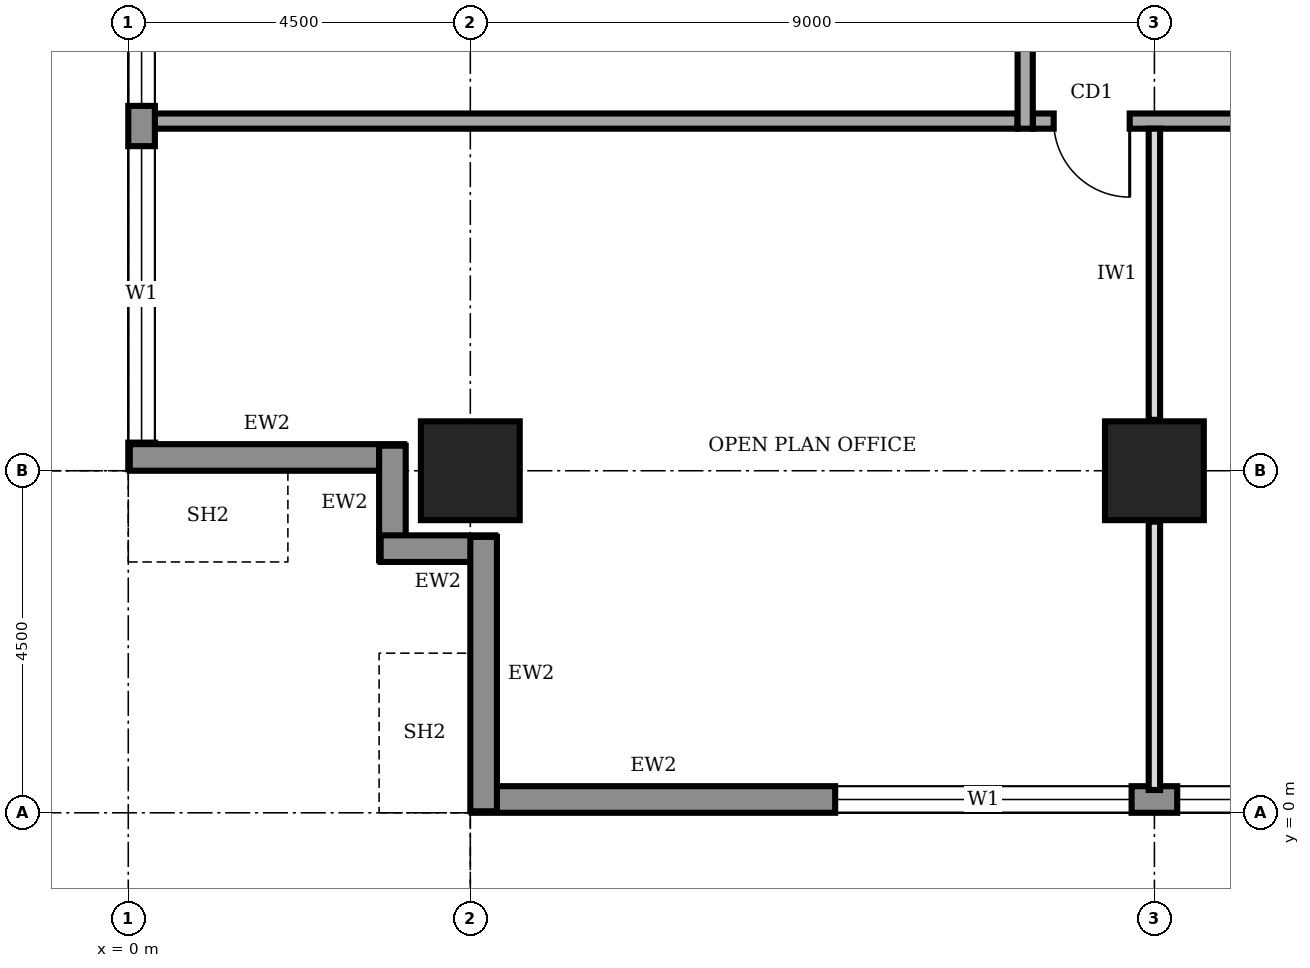
"""IFC4 building model, lengths in metres.
Left out: names, types, materials, properties, quantities, classifications, styles, units other than length and angle.
Written with IfcOpenShell. Run it as: python <this file> out.ifc"""

import sys

from ifc_helpers import new_model, si_unit, direction, frame, frame_2d, origin, origin_2d, place, context, subcontext, project, spatial, rectangle, extrude, element, fill, save


model = new_model("IFC4")
c1 = context("Model", 3, precision=1e-05, world=origin(), true_north=direction((0.0, 1.0)))
c2 = subcontext(c1, "Body", "Model", "MODEL_VIEW")
j1 = project(units=[si_unit("LENGTHUNIT", "METRE"), si_unit("PLANEANGLEUNIT", "RADIAN")], contexts=[c1])
p1 = place(None, origin())
s1 = spatial("IfcSite", under=j1, at=p1, CompositionType="ELEMENT")
p2 = place(p1, origin())
s2 = spatial("IfcBuilding", under=s1, at=p2, CompositionType="ELEMENT")
p3 = place(p2, frame((0.0, 0.0, 277.0)))
s3 = spatial("IfcBuildingStorey", under=s2, at=p3, CompositionType="ELEMENT", Elevation=277.0)
for number, where, z_axis, x_axis in (
    (1, (4.5, 4.5, 0.0), (0.0, 0.0, 1.0), (1.0, 0.0, 0.0)),
    (2, (13.5, 4.5, 0.0), (0.0, 0.0, 1.0), (1.0, 0.0, 0.0)),
):
    element("IfcColumn", number, at=place(p3, frame(where, z_axis=z_axis, x_axis=x_axis)), inside=s3, PredefinedType="COLUMN", context=c2, shape_type="SweptSolid", body=[
        extrude(rectangle(XDim=1.3, YDim=1.3, at=origin_2d()), origin(), (0.0, 0.0, 1.0), 4.0),
    ])
p4 = place(p3, frame((4.52, 0.175, 0.0), z_axis=(0.0, 0.0, 1.0), x_axis=(1.0, 0.0, 0.0)))
e3 = element("IfcWall", 3, at=p4, inside=s3, PredefinedType="STANDARD", context=c2, shape_type="SweptSolid", body=[
    extrude(rectangle(XDim=31.46, YDim=0.35, at=frame_2d((15.73, 0.0))), origin(), (0.0, 0.0, 1.0), 3.75),
])
p5 = place(p4, frame((4.78, 0.0, 0.9)))
e4 = element("IfcOpeningElement", 4, at=p5, cuts=e3, PredefinedType="OPENING", context=c2, shape_type="SweptSolid", body=[
    extrude(rectangle(XDim=3.9, YDim=2.2, at=frame_2d((1.95, 1.1))), frame((0.0, 0.185, 0.0), z_axis=(0.0, -1.0, 0.0), x_axis=(1.0, 0.0, 0.0)), (0.0, 0.0, 1.0), 0.37),
])
p6 = place(p4, frame((9.28, 0.0, 0.9)))
e5 = element("IfcOpeningElement", 5, at=p6, cuts=e3, PredefinedType="OPENING", context=c2, shape_type="SweptSolid", body=[
    extrude(rectangle(XDim=3.9, YDim=2.2, at=frame_2d((1.95, 1.1))), frame((0.0, 0.185, 0.0), z_axis=(0.0, -1.0, 0.0), x_axis=(1.0, 0.0, 0.0)), (0.0, 0.0, 1.0), 0.37),
])
p7 = place(p4, frame((13.78, 0.0, 0.9)))
e6 = element("IfcOpeningElement", 6, at=p7, cuts=e3, PredefinedType="OPENING", context=c2, shape_type="SweptSolid", body=[
    extrude(rectangle(XDim=3.9, YDim=2.2, at=frame_2d((1.95, 1.1))), frame((0.0, 0.185, 0.0), z_axis=(0.0, -1.0, 0.0), x_axis=(1.0, 0.0, 0.0)), (0.0, 0.0, 1.0), 0.37),
])
p8 = place(p4, frame((18.28, 0.0, 0.9)))
e7 = element("IfcOpeningElement", 7, at=p8, cuts=e3, PredefinedType="OPENING", context=c2, shape_type="SweptSolid", body=[
    extrude(rectangle(XDim=3.9, YDim=2.2, at=frame_2d((1.95, 1.1))), frame((0.0, 0.185, 0.0), z_axis=(0.0, -1.0, 0.0), x_axis=(1.0, 0.0, 0.0)), (0.0, 0.0, 1.0), 0.37),
])
p9 = place(p4, frame((22.78, 0.0, 0.9)))
e8 = element("IfcOpeningElement", 8, at=p9, cuts=e3, PredefinedType="OPENING", context=c2, shape_type="SweptSolid", body=[
    extrude(rectangle(XDim=3.9, YDim=2.2, at=frame_2d((1.95, 1.1))), frame((0.0, 0.185, 0.0), z_axis=(0.0, -1.0, 0.0), x_axis=(1.0, 0.0, 0.0)), (0.0, 0.0, 1.0), 0.37),
])
p10 = place(p4, frame((27.21, 0.0, 0.9)))
e9 = element("IfcOpeningElement", 9, at=p10, cuts=e3, PredefinedType="OPENING", context=c2, shape_type="SweptSolid", body=[
    extrude(rectangle(XDim=3.9, YDim=2.2, at=frame_2d((1.95, 1.1))), frame((0.0, 0.185, 0.0), z_axis=(0.0, -1.0, 0.0), x_axis=(1.0, 0.0, 0.0)), (0.0, 0.0, 1.0), 0.37),
])
p11 = place(p3, frame((0.175, 35.98, 0.0), z_axis=(0.0, 0.0, 1.0), x_axis=(0.0, -1.0, 0.0)))
e10 = element("IfcWall", 10, at=p11, inside=s3, PredefinedType="STANDARD", context=c2, shape_type="SweptSolid", body=[
    extrude(rectangle(XDim=31.46, YDim=0.35, at=frame_2d((15.73, 0.0))), origin(), (0.0, 0.0, 1.0), 3.75),
])
p12 = place(p11, frame((27.21, 0.0, 0.9)))
e11 = element("IfcOpeningElement", 11, at=p12, cuts=e10, PredefinedType="OPENING", context=c2, shape_type="SweptSolid", body=[
    extrude(rectangle(XDim=3.9, YDim=2.2, at=frame_2d((1.95, 1.1))), frame((0.0, 0.185, 0.0), z_axis=(0.0, -1.0, 0.0), x_axis=(1.0, 0.0, 0.0)), (0.0, 0.0, 1.0), 0.37),
])
p13 = place(p11, frame((22.78, 0.0, 0.9)))
e12 = element("IfcOpeningElement", 12, at=p13, cuts=e10, PredefinedType="OPENING", context=c2, shape_type="SweptSolid", body=[
    extrude(rectangle(XDim=3.9, YDim=2.2, at=frame_2d((1.95, 1.1))), frame((0.0, 0.185, 0.0), z_axis=(0.0, -1.0, 0.0), x_axis=(1.0, 0.0, 0.0)), (0.0, 0.0, 1.0), 0.37),
])
p14 = place(p11, frame((18.28, 0.0, 0.9)))
e13 = element("IfcOpeningElement", 13, at=p14, cuts=e10, PredefinedType="OPENING", context=c2, shape_type="SweptSolid", body=[
    extrude(rectangle(XDim=3.9, YDim=2.2, at=frame_2d((1.95, 1.1))), frame((0.0, 0.185, 0.0), z_axis=(0.0, -1.0, 0.0), x_axis=(1.0, 0.0, 0.0)), (0.0, 0.0, 1.0), 0.37),
])
p15 = place(p11, frame((13.78, 0.0, 0.9)))
e14 = element("IfcOpeningElement", 14, at=p15, cuts=e10, PredefinedType="OPENING", context=c2, shape_type="SweptSolid", body=[
    extrude(rectangle(XDim=3.9, YDim=2.2, at=frame_2d((1.95, 1.1))), frame((0.0, 0.185, 0.0), z_axis=(0.0, -1.0, 0.0), x_axis=(1.0, 0.0, 0.0)), (0.0, 0.0, 1.0), 0.37),
])
p16 = place(p11, frame((9.28, 0.0, 0.9)))
e15 = element("IfcOpeningElement", 15, at=p16, cuts=e10, PredefinedType="OPENING", context=c2, shape_type="SweptSolid", body=[
    extrude(rectangle(XDim=3.9, YDim=2.2, at=frame_2d((1.95, 1.1))), frame((0.0, 0.185, 0.0), z_axis=(0.0, -1.0, 0.0), x_axis=(1.0, 0.0, 0.0)), (0.0, 0.0, 1.0), 0.37),
])
p17 = place(p11, frame((4.78, 0.0, 0.9)))
e16 = element("IfcOpeningElement", 16, at=p17, cuts=e10, PredefinedType="OPENING", context=c2, shape_type="SweptSolid", body=[
    extrude(rectangle(XDim=3.9, YDim=2.2, at=frame_2d((1.95, 1.1))), frame((0.0, 0.185, 0.0), z_axis=(0.0, -1.0, 0.0), x_axis=(1.0, 0.0, 0.0)), (0.0, 0.0, 1.0), 0.37),
])
p18 = place(p3, frame((0.02, 4.675, 0.0), z_axis=(0.0, 0.0, 1.0), x_axis=(1.0, 0.0, 0.0)))
e17 = element("IfcWall", 17, at=p18, inside=s3, PredefinedType="STANDARD", context=c2, shape_type="SweptSolid", body=[
    extrude(rectangle(XDim=3.61, YDim=0.35, at=frame_2d((1.805, 0.0))), origin(), (0.0, 0.0, 1.0), 2.85),
])
for number, where, z_axis, x_axis in (
    (18, (3.475, 4.83, 0.0), (0.0, 0.0, 1.0), (0.0, -1.0, 0.0)),
    (19, (3.32, 3.475, 0.0), (0.0, 0.0, 1.0), (1.0, 0.0, 0.0)),
):
    element("IfcWall", number, at=place(p3, frame(where, z_axis=z_axis, x_axis=x_axis)), inside=s3, PredefinedType="STANDARD", context=c2, shape_type="SweptSolid", body=[
        extrude(rectangle(XDim=1.51, YDim=0.35, at=frame_2d((0.755, 0.0))), origin(), (0.0, 0.0, 1.0), 3.75),
    ])
p19 = place(p3, frame((4.675, 3.63, 0.0), z_axis=(0.0, 0.0, 1.0), x_axis=(0.0, -1.0, 0.0)))
e20 = element("IfcWall", 20, at=p19, inside=s3, PredefinedType="STANDARD", context=c2, shape_type="SweptSolid", body=[
    extrude(rectangle(XDim=3.61, YDim=0.35, at=frame_2d((1.805, 0.0))), origin(), (0.0, 0.0, 1.0), 2.85),
])
p20 = place(p3, frame((11.9, 9.1, 0.0), z_axis=(0.0, 0.0, 1.0), x_axis=(1.0, 0.0, 0.0)))
e21 = element("IfcWall", 21, at=p20, inside=s3, PredefinedType="SOLIDWALL", context=c2, shape_type="SweptSolid", body=[
    extrude(rectangle(XDim=16.9, YDim=0.2, at=frame_2d((8.45, 0.0))), origin(), (0.0, 0.0, 1.0), 3.75),
])
p21 = place(p20, frame((0.275, 0.0, 0.0)))
e22 = element("IfcOpeningElement", 22, at=p21, cuts=e21, PredefinedType="OPENING", context=c2, shape_type="SweptSolid", body=[
    extrude(rectangle(XDim=1.0, YDim=2.1, at=frame_2d((0.5, 1.05))), frame((0.0, 0.11, 0.0), z_axis=(0.0, -1.0, 0.0), x_axis=(1.0, 0.0, 0.0)), (0.0, 0.0, 1.0), 0.22),
])
p22 = place(p20, frame((8.35, 0.0, 0.0)))
e23 = element("IfcOpeningElement", 23, at=p22, cuts=e21, PredefinedType="OPENING", context=c2, shape_type="SweptSolid", body=[
    extrude(rectangle(XDim=1.8, YDim=2.1, at=frame_2d((0.9, 1.05))), frame((0.0, 0.11, 0.0), z_axis=(0.0, -1.0, 0.0), x_axis=(1.0, 0.0, 0.0)), (0.0, 0.0, 1.0), 0.22),
])
p23 = place(p3, frame((11.8, 32.8, 0.0), z_axis=(0.0, 0.0, 1.0), x_axis=(0.0, -1.0, 0.0)))
e24 = element("IfcWall", 24, at=p23, inside=s3, PredefinedType="SOLIDWALL", context=c2, shape_type="SweptSolid", body=[
    extrude(rectangle(XDim=23.8, YDim=0.2, at=frame_2d((11.9, 0.0))), origin(), (0.0, 0.0, 1.0), 3.75),
])
p24 = place(p23, frame((21.05, 0.0, 0.0)))
e25 = element("IfcOpeningElement", 25, at=p24, cuts=e24, PredefinedType="OPENING", context=c2, shape_type="SweptSolid", body=[
    extrude(rectangle(XDim=1.0, YDim=2.1, at=frame_2d((0.5, 1.05))), frame((0.0, 0.11, 0.0), z_axis=(0.0, -1.0, 0.0), x_axis=(1.0, 0.0, 0.0)), (0.0, 0.0, 1.0), 0.22),
])
p25 = place(p23, frame((17.65, 0.0, 0.0)))
e26 = element("IfcOpeningElement", 26, at=p25, cuts=e24, PredefinedType="OPENING", context=c2, shape_type="SweptSolid", body=[
    extrude(rectangle(XDim=0.9, YDim=2.1, at=frame_2d((0.45, 1.05))), frame((0.0, 0.11, 0.0), z_axis=(0.0, -1.0, 0.0), x_axis=(1.0, 0.0, 0.0)), (0.0, 0.0, 1.0), 0.22),
])
p26 = place(p23, frame((14.45, 0.0, 0.0)))
e27 = element("IfcOpeningElement", 27, at=p26, cuts=e24, PredefinedType="OPENING", context=c2, shape_type="SweptSolid", body=[
    extrude(rectangle(XDim=0.9, YDim=2.1, at=frame_2d((0.45, 1.05))), frame((0.0, 0.11, 0.0), z_axis=(0.0, -1.0, 0.0), x_axis=(1.0, 0.0, 0.0)), (0.0, 0.0, 1.0), 0.22),
])
p27 = place(p23, frame((8.9, 0.0, 0.0)))
e28 = element("IfcOpeningElement", 28, at=p27, cuts=e24, PredefinedType="OPENING", context=c2, shape_type="SweptSolid", body=[
    extrude(rectangle(XDim=0.9, YDim=2.1, at=frame_2d((0.45, 1.05))), frame((0.0, 0.11, 0.0), z_axis=(0.0, -1.0, 0.0), x_axis=(1.0, 0.0, 0.0)), (0.0, 0.0, 1.0), 0.22),
])
p28 = place(p23, frame((6.3, 0.0, 0.0)))
e29 = element("IfcOpeningElement", 29, at=p28, cuts=e24, PredefinedType="OPENING", context=c2, shape_type="SweptSolid", body=[
    extrude(rectangle(XDim=1.0, YDim=2.1, at=frame_2d((0.5, 1.05))), frame((0.0, 0.11, 0.0), z_axis=(0.0, -1.0, 0.0), x_axis=(1.0, 0.0, 0.0)), (0.0, 0.0, 1.0), 0.22),
])
p29 = place(p23, frame((11.4, 0.0, 0.0)))
e30 = element("IfcOpeningElement", 30, at=p29, cuts=e24, PredefinedType="OPENING", context=c2, shape_type="SweptSolid", body=[
    extrude(rectangle(XDim=1.0, YDim=2.1, at=frame_2d((0.5, 1.05))), frame((0.0, 0.11, 0.0), z_axis=(0.0, -1.0, 0.0), x_axis=(1.0, 0.0, 0.0)), (0.0, 0.0, 1.0), 0.22),
])
p30 = place(p23, frame((2.3, 0.0, 0.0)))
e31 = element("IfcOpeningElement", 31, at=p30, cuts=e24, PredefinedType="OPENING", context=c2, shape_type="SweptSolid", body=[
    extrude(rectangle(XDim=1.0, YDim=2.1, at=frame_2d((0.5, 1.05))), frame((0.0, 0.11, 0.0), z_axis=(0.0, -1.0, 0.0), x_axis=(1.0, 0.0, 0.0)), (0.0, 0.0, 1.0), 0.22),
])
p31 = place(p3, frame((0.3, 9.1, 0.0), z_axis=(0.0, 0.0, 1.0), x_axis=(1.0, 0.0, 0.0)))
e32 = element("IfcWall", 32, at=p31, inside=s3, PredefinedType="SOLIDWALL", context=c2, shape_type="SweptSolid", body=[
    extrude(rectangle(XDim=11.4, YDim=0.2, at=frame_2d((5.7, 0.0))), origin(), (0.0, 0.0, 1.0), 3.75),
])
p32 = place(p3, frame((13.5, 0.3, 0.0), z_axis=(0.0, 0.0, 1.0), x_axis=(0.0, 1.0, 0.0)))
e33 = element("IfcWall", 33, at=p32, inside=s3, PredefinedType="PARTITIONING", context=c2, shape_type="SweptSolid", body=[
    extrude(rectangle(XDim=3.53, YDim=0.15, at=frame_2d((1.765, 0.0))), origin(), (0.0, 0.0, 1.0), 2.85),
])
p33 = place(p3, frame((13.5, 5.17, 0.0), z_axis=(0.0, 0.0, 1.0), x_axis=(0.0, 1.0, 0.0)))
e34 = element("IfcWall", 34, at=p33, inside=s3, PredefinedType="PARTITIONING", context=c2, shape_type="SweptSolid", body=[
    extrude(rectangle(XDim=3.83, YDim=0.15, at=frame_2d((1.915, 0.0))), origin(), (0.0, 0.0, 1.0), 2.85),
])
p34 = place(p5, origin())
e35 = element("IfcWindow", 35, at=p34, inside=s3, PartitioningType="SINGLE_PANEL", PredefinedType="WINDOW", context=c2, shape_type="SweptSolid", body=[
    extrude(rectangle(XDim=3.9, YDim=2.2, at=frame_2d((1.95, 1.1))), frame((0.0, 0.03, 0.0), z_axis=(0.0, -1.0, 0.0), x_axis=(1.0, 0.0, 0.0)), (0.0, 0.0, 1.0), 0.06),
])
fill(e4, e35)
p35 = place(p6, origin())
e36 = element("IfcWindow", 36, at=p35, inside=s3, PartitioningType="SINGLE_PANEL", PredefinedType="WINDOW", context=c2, shape_type="SweptSolid", body=[
    extrude(rectangle(XDim=3.9, YDim=2.2, at=frame_2d((1.95, 1.1))), frame((0.0, 0.03, 0.0), z_axis=(0.0, -1.0, 0.0), x_axis=(1.0, 0.0, 0.0)), (0.0, 0.0, 1.0), 0.06),
])
fill(e5, e36)
p36 = place(p12, origin())
e37 = element("IfcWindow", 37, at=p36, inside=s3, PartitioningType="SINGLE_PANEL", PredefinedType="WINDOW", context=c2, shape_type="SweptSolid", body=[
    extrude(rectangle(XDim=3.9, YDim=2.2, at=frame_2d((1.95, 1.1))), frame((0.0, 0.03, 0.0), z_axis=(0.0, -1.0, 0.0), x_axis=(1.0, 0.0, 0.0)), (0.0, 0.0, 1.0), 0.06),
])
fill(e11, e37)
p37 = place(p13, origin())
e38 = element("IfcWindow", 38, at=p37, inside=s3, PartitioningType="SINGLE_PANEL", PredefinedType="WINDOW", context=c2, shape_type="SweptSolid", body=[
    extrude(rectangle(XDim=3.9, YDim=2.2, at=frame_2d((1.95, 1.1))), frame((0.0, 0.03, 0.0), z_axis=(0.0, -1.0, 0.0), x_axis=(1.0, 0.0, 0.0)), (0.0, 0.0, 1.0), 0.06),
])
fill(e12, e38)
p38 = place(p21, frame((1.0, 0.0, 0.0), z_axis=(0.0, 0.0, 1.0), x_axis=(-1.0, 0.0, 0.0)))
e39 = element("IfcDoor", 39, at=p38, inside=s3, OperationType="SINGLE_SWING_LEFT", PredefinedType="DOOR", context=c2, shape_type="SweptSolid", body=[
    extrude(rectangle(XDim=1.0, YDim=2.1, at=frame_2d((0.5, 1.05))), frame((0.0, 0.025, 0.0), z_axis=(0.0, -1.0, 0.0), x_axis=(1.0, 0.0, 0.0)), (0.0, 0.0, 1.0), 0.05),
])
fill(e22, e39)
save(model, sys.argv[1])
